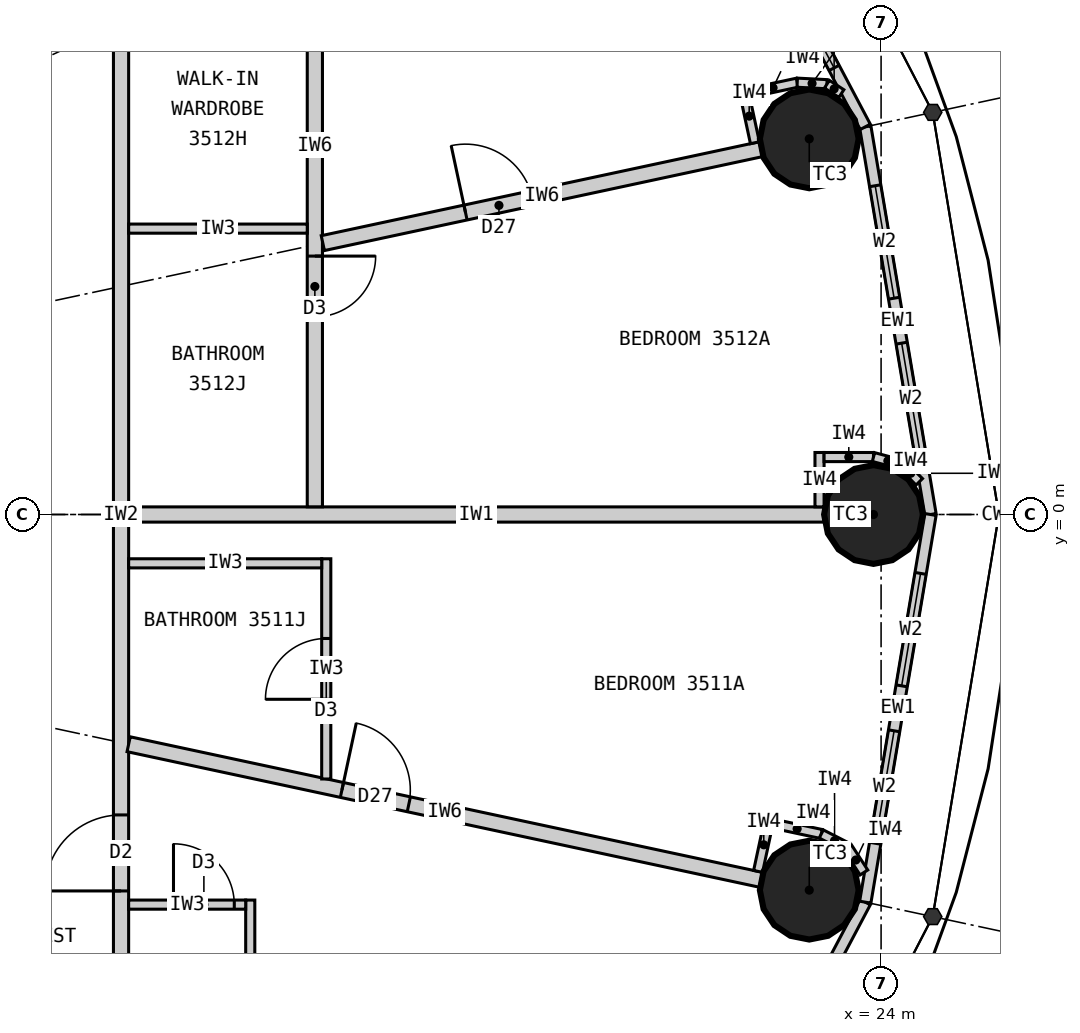
"""IFC4 building model, lengths in metres.
Left out: names, types, materials, properties, quantities, classifications, styles, units other than length and angle.
Written with IfcOpenShell. Run it as: python <this file> out.ifc"""

import sys

from ifc_helpers import new_model, si_unit, direction, frame, frame_2d, origin, origin_2d, place, context, subcontext, project, spatial, rectangle, circle, extrude, clip, halfspace, element, fill, save


model = new_model("IFC4")
c1 = context("Model", 3, precision=1e-05, world=origin(), true_north=direction((0.0, 1.0)))
c2 = subcontext(c1, "Body", "Model", "MODEL_VIEW")
j1 = project(units=[si_unit("LENGTHUNIT", "METRE"), si_unit("PLANEANGLEUNIT", "RADIAN")], contexts=[c1])
p1 = place(None, origin())
s1 = spatial("IfcSite", under=j1, at=p1, CompositionType="ELEMENT")
p2 = place(p1, origin())
s2 = spatial("IfcBuilding", under=s1, at=p2, CompositionType="ELEMENT")
p3 = place(p2, frame((0.0, 0.0, 135.3)))
s3 = spatial("IfcBuildingStorey", under=s2, at=p3, CompositionType="ELEMENT", Elevation=135.3)
for number, where, z_axis, x_axis in (
    (1, (23.9, 0.0, 0.0), (0.0, 0.0, 1.0), (1.0, 0.0, 0.0)),
    (2, (23.055, 4.942, 0.0), (0.0, 0.0, 1.0), (1.0, 0.0, 0.0)),
    (3, (23.055, -4.942, 0.0), (0.0, 0.0, 1.0), (1.0, 0.0, 0.0)),
):
    element("IfcColumn", number, at=place(p3, frame(where, z_axis=z_axis, x_axis=x_axis)), inside=s3, PredefinedType="COLUMN", context=c2, shape_type="Clipping", body=[
        clip(extrude(circle(Radius=0.65, at=origin_2d()), origin(), (0.0, 0.0, 1.0), 3.3), halfspace(frame((0.0, 0.0, 2.25), z_axis=(0.0, 0.0, 1.0), x_axis=(1.0, 0.0, 0.0)), False)),
    ])
p4 = place(p3, frame((24.65, 0.0, 0.0), z_axis=(0.0, 0.0, 1.0), x_axis=(-0.165883894218, 0.986145290329, 0.0)))
e4 = element("IfcWall", 4, at=p4, inside=s3, PredefinedType="ELEMENTEDWALL", context=c2, shape_type="SweptSolid", body=[
    extrude(rectangle(XDim=5.172, YDim=0.15, at=frame_2d((2.586, 0.0))), origin(), (0.0, 0.0, 1.0), 3.05),
])
p5 = place(p4, frame((0.786, 0.0, 0.9)))
e5 = element("IfcOpeningElement", 5, at=p5, cuts=e4, PredefinedType="OPENING", context=c2, shape_type="SweptSolid", body=[
    extrude(rectangle(XDim=1.5, YDim=1.9, at=frame_2d((0.75, 0.95))), frame((0.0, 0.085, 0.0), z_axis=(0.0, -1.0, 0.0), x_axis=(1.0, 0.0, 0.0)), (0.0, 0.0, 1.0), 0.17),
])
p6 = place(p4, frame((2.886, 0.0, 0.9)))
e6 = element("IfcOpeningElement", 6, at=p6, cuts=e4, PredefinedType="OPENING", context=c2, shape_type="SweptSolid", body=[
    extrude(rectangle(XDim=1.5, YDim=1.9, at=frame_2d((0.75, 0.95))), frame((0.0, 0.085, 0.0), z_axis=(0.0, -1.0, 0.0), x_axis=(1.0, 0.0, 0.0)), (0.0, 0.0, 1.0), 0.17),
])
p7 = place(p3, frame((23.792, 5.1, 0.0), z_axis=(0.0, 0.0, 1.0), x_axis=(-0.467814388454, 0.883826735257, 0.0)))
e7 = element("IfcWall", 7, at=p7, inside=s3, PredefinedType="ELEMENTEDWALL", context=c2, shape_type="SweptSolid", body=[
    extrude(rectangle(XDim=5.354, YDim=0.15, at=frame_2d((2.677, 0.0))), origin(), (0.0, 0.0, 1.0), 3.05),
])
p8 = place(p7, frame((0.877, 0.0, 0.9)))
e8 = element("IfcOpeningElement", 8, at=p8, cuts=e7, PredefinedType="OPENING", context=c2, shape_type="SweptSolid", body=[
    extrude(rectangle(XDim=1.5, YDim=1.9, at=frame_2d((0.75, 0.95))), frame((0.0, 0.085, 0.0), z_axis=(0.0, -1.0, 0.0), x_axis=(1.0, 0.0, 0.0)), (0.0, 0.0, 1.0), 0.17),
])
p9 = place(p7, frame((2.977, 0.0, 0.9)))
e9 = element("IfcOpeningElement", 9, at=p9, cuts=e7, PredefinedType="OPENING", context=c2, shape_type="SweptSolid", body=[
    extrude(rectangle(XDim=1.5, YDim=1.9, at=frame_2d((0.75, 0.95))), frame((0.0, 0.085, 0.0), z_axis=(0.0, -1.0, 0.0), x_axis=(1.0, 0.0, 0.0)), (0.0, 0.0, 1.0), 0.17),
])
p10 = place(p3, frame((21.287, -9.832, 0.0), z_axis=(0.0, 0.0, 1.0), x_axis=(0.467814388454, 0.883826735257, 0.0)))
e10 = element("IfcWall", 10, at=p10, inside=s3, PredefinedType="ELEMENTEDWALL", context=c2, shape_type="SweptSolid", body=[
    extrude(rectangle(XDim=5.354, YDim=0.15, at=frame_2d((2.677, 0.0))), origin(), (0.0, 0.0, 1.0), 3.05),
])
p11 = place(p10, frame((0.877, 0.0, 0.9)))
e11 = element("IfcOpeningElement", 11, at=p11, cuts=e10, PredefinedType="OPENING", context=c2, shape_type="SweptSolid", body=[
    extrude(rectangle(XDim=1.5, YDim=1.9, at=frame_2d((0.75, 0.95))), frame((0.0, 0.085, 0.0), z_axis=(0.0, -1.0, 0.0), x_axis=(1.0, 0.0, 0.0)), (0.0, 0.0, 1.0), 0.17),
])
p12 = place(p10, frame((2.977, 0.0, 0.9)))
e12 = element("IfcOpeningElement", 12, at=p12, cuts=e10, PredefinedType="OPENING", context=c2, shape_type="SweptSolid", body=[
    extrude(rectangle(XDim=1.5, YDim=1.9, at=frame_2d((0.75, 0.95))), frame((0.0, 0.085, 0.0), z_axis=(0.0, -1.0, 0.0), x_axis=(1.0, 0.0, 0.0)), (0.0, 0.0, 1.0), 0.17),
])
p13 = place(p3, frame((23.792, -5.1, 0.0), z_axis=(0.0, 0.0, 1.0), x_axis=(0.165883894218, 0.986145290329, 0.0)))
e13 = element("IfcWall", 13, at=p13, inside=s3, PredefinedType="ELEMENTEDWALL", context=c2, shape_type="SweptSolid", body=[
    extrude(rectangle(XDim=5.172, YDim=0.15, at=frame_2d((2.586, 0.0))), origin(), (0.0, 0.0, 1.0), 3.05),
])
p14 = place(p13, frame((0.786, 0.0, 0.9)))
e14 = element("IfcOpeningElement", 14, at=p14, cuts=e13, PredefinedType="OPENING", context=c2, shape_type="SweptSolid", body=[
    extrude(rectangle(XDim=1.5, YDim=1.9, at=frame_2d((0.75, 0.95))), frame((0.0, 0.085, 0.0), z_axis=(0.0, -1.0, 0.0), x_axis=(1.0, 0.0, 0.0)), (0.0, 0.0, 1.0), 0.17),
])
p15 = place(p13, frame((2.886, 0.0, 0.9)))
e15 = element("IfcOpeningElement", 15, at=p15, cuts=e13, PredefinedType="OPENING", context=c2, shape_type="SweptSolid", body=[
    extrude(rectangle(XDim=1.5, YDim=1.9, at=frame_2d((0.75, 0.95))), frame((0.0, 0.085, 0.0), z_axis=(0.0, -1.0, 0.0), x_axis=(1.0, 0.0, 0.0)), (0.0, 0.0, 1.0), 0.17),
])
p16 = place(p3, frame((14.0, -9.9, 0.0), z_axis=(0.0, 0.0, 1.0), x_axis=(0.0, 1.0, 0.0)))
e16 = element("IfcWall", 16, at=p16, inside=s3, PredefinedType="PARTITIONING", context=c2, shape_type="SweptSolid", body=[
    extrude(rectangle(XDim=19.8, YDim=0.2, at=frame_2d((9.9, 0.0))), origin(), (0.0, 0.0, 1.0), 3.05),
])
p17 = place(p16, frame((4.948, 0.0, 0.0)))
e17 = element("IfcOpeningElement", 17, at=p17, cuts=e16, PredefinedType="OPENING", context=c2, shape_type="SweptSolid", body=[
    extrude(rectangle(XDim=1.0, YDim=2.2, at=frame_2d((0.5, 1.1))), frame((0.0, 0.11, 0.0), z_axis=(0.0, -1.0, 0.0), x_axis=(1.0, 0.0, 0.0)), (0.0, 0.0, 1.0), 0.22),
])
p18 = place(p16, frame((18.641, 0.0, 0.0)))
e18 = element("IfcOpeningElement", 18, at=p18, cuts=e16, PredefinedType="OPENING", context=c2, shape_type="SweptSolid", body=[
    extrude(rectangle(XDim=1.0, YDim=2.2, at=frame_2d((0.5, 1.1))), frame((0.0, 0.11, 0.0), z_axis=(0.0, -1.0, 0.0), x_axis=(1.0, 0.0, 0.0)), (0.0, 0.0, 1.0), 0.22),
])
p19 = place(p3, frame((14.1, 0.0, 0.0), z_axis=(0.0, 0.0, 1.0), x_axis=(1.0, 0.0, 0.0)))
e19 = element("IfcWall", 19, at=p19, inside=s3, PredefinedType="PARTITIONING", context=c2, shape_type="SweptSolid", body=[
    extrude(rectangle(XDim=9.15, YDim=0.2, at=frame_2d((4.575, 0.0))), origin(), (0.0, 0.0, 1.0), 2.15),
])
p20 = place(p3, frame((14.1, -3.022, 0.0), z_axis=(0.0, 0.0, 1.0), x_axis=(0.977783513367, -0.209617272638, 0.0)))
e20 = element("IfcWall", 20, at=p20, inside=s3, PredefinedType="PARTITIONING", context=c2, shape_type="SweptSolid", body=[
    extrude(rectangle(XDim=8.508, YDim=0.2, at=frame_2d((4.254, 0.0))), origin(), (0.0, 0.0, 1.0), 2.15),
])
p21 = place(p20, frame((2.87, 0.0, 0.0)))
e21 = element("IfcOpeningElement", 21, at=p21, cuts=e20, PredefinedType="OPENING", context=c2, shape_type="SweptSolid", body=[
    extrude(rectangle(XDim=0.9, YDim=2.1, at=frame_2d((0.45, 1.05))), frame((0.0, 0.11, 0.0), z_axis=(0.0, -1.0, 0.0), x_axis=(1.0, 0.0, 0.0)), (0.0, 0.0, 1.0), 0.22),
])
p22 = place(p3, frame((15.7, -7.152, 0.0), z_axis=(0.0, 0.0, 1.0), x_axis=(0.0, 1.0, 0.0)))
e22 = element("IfcWall", 22, at=p22, inside=s3, PredefinedType="PARTITIONING", context=c2, shape_type="SweptSolid", body=[
    extrude(rectangle(XDim=2.079, YDim=0.12, at=frame_2d((1.04, 0.0))), origin(), (0.0, 0.0, 1.0), 3.05),
])
p23 = place(p3, frame((14.1, -5.133, 0.0), z_axis=(0.0, 0.0, 1.0), x_axis=(1.0, 0.0, 0.0)))
e23 = element("IfcWall", 23, at=p23, inside=s3, PredefinedType="PARTITIONING", context=c2, shape_type="SweptSolid", body=[
    extrude(rectangle(XDim=1.54, YDim=0.12, at=frame_2d((0.77, 0.0))), origin(), (0.0, 0.0, 1.0), 3.05),
])
p24 = place(p23, frame((0.59, 0.0, 0.0)))
e24 = element("IfcOpeningElement", 24, at=p24, cuts=e23, PredefinedType="OPENING", context=c2, shape_type="SweptSolid", body=[
    extrude(rectangle(XDim=0.8, YDim=2.1, at=frame_2d((0.4, 1.05))), frame((0.0, 0.07, 0.0), z_axis=(0.0, -1.0, 0.0), x_axis=(1.0, 0.0, 0.0)), (0.0, 0.0, 1.0), 0.14),
])
p25 = place(p3, frame((16.7, -3.48, 0.0), z_axis=(0.0, 0.0, 1.0), x_axis=(0.0, 1.0, 0.0)))
e25 = element("IfcWall", 25, at=p25, inside=s3, PredefinedType="PARTITIONING", context=c2, shape_type="SweptSolid", body=[
    extrude(rectangle(XDim=2.897, YDim=0.12, at=frame_2d((1.449, 0.0))), origin(), (0.0, 0.0, 1.0), 3.05),
])
p26 = place(p25, frame((1.049, 0.0, 0.0)))
e26 = element("IfcOpeningElement", 26, at=p26, cuts=e25, PredefinedType="OPENING", context=c2, shape_type="SweptSolid", body=[
    extrude(rectangle(XDim=0.8, YDim=2.1, at=frame_2d((0.4, 1.05))), frame((0.0, 0.07, 0.0), z_axis=(0.0, -1.0, 0.0), x_axis=(1.0, 0.0, 0.0)), (0.0, 0.0, 1.0), 0.14),
])
p27 = place(p3, frame((14.1, -0.643, 0.0), z_axis=(0.0, 0.0, 1.0), x_axis=(1.0, 0.0, 0.0)))
e27 = element("IfcWall", 27, at=p27, inside=s3, PredefinedType="PARTITIONING", context=c2, shape_type="SweptSolid", body=[
    extrude(rectangle(XDim=2.54, YDim=0.12, at=frame_2d((1.27, 0.0))), origin(), (0.0, 0.0, 1.0), 3.05),
])
p28 = place(p3, frame((16.55, 0.101, 0.0), z_axis=(0.0, 0.0, 1.0), x_axis=(0.0, 1.0, 0.0)))
e28 = element("IfcWall", 28, at=p28, inside=s3, PredefinedType="PARTITIONING", context=c2, shape_type="SweptSolid", body=[
    extrude(rectangle(XDim=9.508, YDim=0.2, at=frame_2d((4.754, 0.0))), origin(), (0.0, 0.0, 1.0), 3.05),
])
p29 = place(p28, frame((2.499, 0.0, 0.0)))
e29 = element("IfcOpeningElement", 29, at=p29, cuts=e28, PredefinedType="OPENING", context=c2, shape_type="SweptSolid", body=[
    extrude(rectangle(XDim=0.8, YDim=2.1, at=frame_2d((0.4, 1.05))), frame((0.0, 0.11, 0.0), z_axis=(0.0, -1.0, 0.0), x_axis=(1.0, 0.0, 0.0)), (0.0, 0.0, 1.0), 0.22),
])
p30 = place(p28, frame((6.94, 0.0, 0.0)))
e30 = element("IfcOpeningElement", 30, at=p30, cuts=e28, PredefinedType="OPENING", context=c2, shape_type="SweptSolid", body=[
    extrude(rectangle(XDim=0.9, YDim=2.1, at=frame_2d((0.45, 1.05))), frame((0.0, 0.11, 0.0), z_axis=(0.0, -1.0, 0.0), x_axis=(1.0, 0.0, 0.0)), (0.0, 0.0, 1.0), 0.22),
])
p31 = place(p3, frame((16.655, 3.57, 0.0), z_axis=(0.0, 0.0, 1.0), x_axis=(0.977781197989, 0.209628072687, 0.0)))
e31 = element("IfcWall", 31, at=p31, inside=s3, PredefinedType="PARTITIONING", context=c2, shape_type="SweptSolid", body=[
    extrude(rectangle(XDim=5.896, YDim=0.2, at=frame_2d((2.948, 0.0))), origin(), (0.0, 0.0, 1.0), 2.15),
])
p32 = place(p31, frame((1.92, 0.0, 0.0)))
e32 = element("IfcOpeningElement", 32, at=p32, cuts=e31, PredefinedType="OPENING", context=c2, shape_type="SweptSolid", body=[
    extrude(rectangle(XDim=0.9, YDim=2.1, at=frame_2d((0.45, 1.05))), frame((0.0, 0.11, 0.0), z_axis=(0.0, -1.0, 0.0), x_axis=(1.0, 0.0, 0.0)), (0.0, 0.0, 1.0), 0.22),
])
p33 = place(p3, frame((14.1, 3.761, 0.0), z_axis=(0.0, 0.0, 1.0), x_axis=(1.0, 0.0, 0.0)))
e33 = element("IfcWall", 33, at=p33, inside=s3, PredefinedType="PARTITIONING", context=c2, shape_type="SweptSolid", body=[
    extrude(rectangle(XDim=2.35, YDim=0.12, at=frame_2d((1.175, 0.0))), origin(), (0.0, 0.0, 1.0), 2.15),
])
p34 = place(p3, frame((23.19, 0.1, 0.0), z_axis=(0.0, 0.0, 1.0), x_axis=(0.0, 1.0, 0.0)))
e34 = element("IfcWall", 34, at=p34, inside=s3, PredefinedType="PARTITIONING", context=c2, shape_type="SweptSolid", body=[
    extrude(rectangle(XDim=0.716, YDim=0.12, at=frame_2d((0.358, 0.0))), origin(), (0.0, 0.0, 1.0), 3.05),
])
p35 = place(p3, frame((23.25, 0.756, 0.0), z_axis=(0.0, 0.0, 1.0), x_axis=(1.0, 0.0, 0.0)))
e35 = element("IfcWall", 35, at=p35, inside=s3, PredefinedType="PARTITIONING", context=c2, shape_type="SweptSolid", body=[
    extrude(rectangle(XDim=0.65, YDim=0.12, at=frame_2d((0.325, 0.0))), origin(), (0.0, 0.0, 1.0), 3.05),
])
p36 = place(p3, frame((23.9, 0.756, 0.0), z_axis=(0.0, 0.0, 1.0), x_axis=(0.965892334856, -0.2589440045, 0.0)))
e36 = element("IfcWall", 36, at=p36, inside=s3, PredefinedType="PARTITIONING", context=c2, shape_type="SweptSolid", body=[
    extrude(rectangle(XDim=0.391, YDim=0.12, at=frame_2d((0.196, 0.0))), origin(), (0.0, 0.0, 1.0), 3.05),
])
p37 = place(p3, frame((24.278, 0.655, 0.0), z_axis=(0.0, 0.0, 1.0), x_axis=(0.707106781187, -0.707106781187, 0.0)))
e37 = element("IfcWall", 37, at=p37, inside=s3, PredefinedType="PARTITIONING", context=c2, shape_type="SweptSolid", body=[
    extrude(rectangle(XDim=0.318, YDim=0.12, at=frame_2d((0.159, 0.0))), origin(), (0.0, 0.0, 1.0), 3.05),
])
p38 = place(p3, frame((22.34, 4.891, 0.0), z_axis=(0.0, 0.0, 1.0), x_axis=(-0.20948248875, 0.977812398626, 0.0)))
e38 = element("IfcWall", 38, at=p38, inside=s3, PredefinedType="PARTITIONING", context=c2, shape_type="SweptSolid", body=[
    extrude(rectangle(XDim=0.716, YDim=0.12, at=frame_2d((0.358, 0.0))), origin(), (0.0, 0.0, 1.0), 3.05),
])
p39 = place(p3, frame((22.261, 5.545, 0.0), z_axis=(0.0, 0.0, 1.0), x_axis=(0.977785919621, 0.209606048079, 0.0)))
e39 = element("IfcWall", 39, at=p39, inside=s3, PredefinedType="PARTITIONING", context=c2, shape_type="SweptSolid", body=[
    extrude(rectangle(XDim=0.65, YDim=0.12, at=frame_2d((0.325, 0.0))), origin(), (0.0, 0.0, 1.0), 3.05),
])
p40 = place(p3, frame((22.896, 5.681, 0.0), z_axis=(0.0, 0.0, 1.0), x_axis=(0.998721012592, -0.050560251262, 0.0)))
e40 = element("IfcWall", 40, at=p40, inside=s3, PredefinedType="PARTITIONING", context=c2, shape_type="SweptSolid", body=[
    extrude(rectangle(XDim=0.391, YDim=0.12, at=frame_2d((0.196, 0.0))), origin(), (0.0, 0.0, 1.0), 3.05),
])
p41 = place(p3, frame((23.287, 5.661, 0.0), z_axis=(0.0, 0.0, 1.0), x_axis=(0.839916668497, -0.542715385798, 0.0)))
e41 = element("IfcWall", 41, at=p41, inside=s3, PredefinedType="PARTITIONING", context=c2, shape_type="SweptSolid", body=[
    extrude(rectangle(XDim=0.227, YDim=0.12, at=frame_2d((0.113, 0.0))), origin(), (0.0, 0.0, 1.0), 3.05),
])
p42 = place(p3, frame((22.382, -4.695, 0.0), z_axis=(0.0, 0.0, 1.0), x_axis=(0.209808658628, 0.977742464438, 0.0)))
e42 = element("IfcWall", 42, at=p42, inside=s3, PredefinedType="PARTITIONING", context=c2, shape_type="SweptSolid", body=[
    extrude(rectangle(XDim=0.716, YDim=0.12, at=frame_2d((0.358, 0.0))), origin(), (0.0, 0.0, 1.0), 3.05),
])
p43 = place(p3, frame((22.578, -4.067, 0.0), z_axis=(0.0, 0.0, 1.0), x_axis=(0.977802414077, -0.209529088731, 0.0)))
e43 = element("IfcWall", 43, at=p43, inside=s3, PredefinedType="PARTITIONING", context=c2, shape_type="SweptSolid", body=[
    extrude(rectangle(XDim=0.65, YDim=0.12, at=frame_2d((0.325, 0.0))), origin(), (0.0, 0.0, 1.0), 3.05),
])
for number, where, z_axis, x_axis in (
    (44, (23.213, -4.203, 0.0), (0.0, 0.0, 1.0), (0.89, -0.456, 0.0)),
    (45, (23.562, -4.381, 0.0), (0.0, 0.0, 1.0), (0.543, -0.84, 0.0)),
):
    element("IfcWall", number, at=place(p3, frame(where, z_axis=z_axis, x_axis=x_axis)), inside=s3, PredefinedType="PARTITIONING", context=c2, shape_type="SweptSolid", body=[
        extrude(rectangle(XDim=0.391, YDim=0.12, at=frame_2d((0.196, 0.0))), origin(), (0.0, 0.0, 1.0), 3.05),
    ])
p44 = place(p5, origin())
e46 = element("IfcWindow", 46, at=p44, inside=s3, PartitioningType="SINGLE_PANEL", PredefinedType="WINDOW", context=c2, shape_type="SweptSolid", body=[
    extrude(rectangle(XDim=1.5, YDim=1.9, at=frame_2d((0.75, 0.95))), frame((0.0, 0.03, 0.0), z_axis=(0.0, -1.0, 0.0), x_axis=(1.0, 0.0, 0.0)), (0.0, 0.0, 1.0), 0.06),
])
fill(e5, e46)
p45 = place(p6, origin())
e47 = element("IfcWindow", 47, at=p45, inside=s3, PartitioningType="SINGLE_PANEL", PredefinedType="WINDOW", context=c2, shape_type="SweptSolid", body=[
    extrude(rectangle(XDim=1.5, YDim=1.9, at=frame_2d((0.75, 0.95))), frame((0.0, 0.03, 0.0), z_axis=(0.0, -1.0, 0.0), x_axis=(1.0, 0.0, 0.0)), (0.0, 0.0, 1.0), 0.06),
])
fill(e6, e47)
p46 = place(p8, origin())
e48 = element("IfcWindow", 48, at=p46, inside=s3, PartitioningType="SINGLE_PANEL", PredefinedType="WINDOW", context=c2, shape_type="SweptSolid", body=[
    extrude(rectangle(XDim=1.5, YDim=1.9, at=frame_2d((0.75, 0.95))), frame((0.0, 0.03, 0.0), z_axis=(0.0, -1.0, 0.0), x_axis=(1.0, 0.0, 0.0)), (0.0, 0.0, 1.0), 0.06),
])
fill(e8, e48)
p47 = place(p14, origin())
e49 = element("IfcWindow", 49, at=p47, inside=s3, PartitioningType="SINGLE_PANEL", PredefinedType="WINDOW", context=c2, shape_type="SweptSolid", body=[
    extrude(rectangle(XDim=1.5, YDim=1.9, at=frame_2d((0.75, 0.95))), frame((0.0, 0.03, 0.0), z_axis=(0.0, -1.0, 0.0), x_axis=(1.0, 0.0, 0.0)), (0.0, 0.0, 1.0), 0.06),
])
fill(e14, e49)
p48 = place(p15, origin())
e50 = element("IfcWindow", 50, at=p48, inside=s3, PartitioningType="SINGLE_PANEL", PredefinedType="WINDOW", context=c2, shape_type="SweptSolid", body=[
    extrude(rectangle(XDim=1.5, YDim=1.9, at=frame_2d((0.75, 0.95))), frame((0.0, 0.03, 0.0), z_axis=(0.0, -1.0, 0.0), x_axis=(1.0, 0.0, 0.0)), (0.0, 0.0, 1.0), 0.06),
])
fill(e15, e50)
p49 = place(p24, origin())
e51 = element("IfcDoor", 51, at=p49, inside=s3, OperationType="SINGLE_SWING_LEFT", PredefinedType="DOOR", context=c2, shape_type="SweptSolid", body=[
    extrude(rectangle(XDim=0.8, YDim=2.1, at=frame_2d((0.4, 1.05))), frame((0.0, 0.025, 0.0), z_axis=(0.0, -1.0, 0.0), x_axis=(1.0, 0.0, 0.0)), (0.0, 0.0, 1.0), 0.05),
])
fill(e24, e51)
p50 = place(p17, origin())
e52 = element("IfcDoor", 52, at=p50, inside=s3, OperationType="SINGLE_SWING_LEFT", PredefinedType="DOOR", context=c2, shape_type="SweptSolid", body=[
    extrude(rectangle(XDim=1.0, YDim=2.2, at=frame_2d((0.5, 1.1))), frame((0.0, 0.025, 0.0), z_axis=(0.0, -1.0, 0.0), x_axis=(1.0, 0.0, 0.0)), (0.0, 0.0, 1.0), 0.05),
])
fill(e17, e52)
p51 = place(p26, origin())
e53 = element("IfcDoor", 53, at=p51, inside=s3, OperationType="SINGLE_SWING_LEFT", PredefinedType="DOOR", context=c2, shape_type="SweptSolid", body=[
    extrude(rectangle(XDim=0.8, YDim=2.1, at=frame_2d((0.4, 1.05))), frame((0.0, 0.025, 0.0), z_axis=(0.0, -1.0, 0.0), x_axis=(1.0, 0.0, 0.0)), (0.0, 0.0, 1.0), 0.05),
])
fill(e26, e53)
p52 = place(p21, origin())
e54 = element("IfcDoor", 54, at=p52, inside=s3, OperationType="SINGLE_SWING_LEFT", PredefinedType="DOOR", context=c2, shape_type="SweptSolid", body=[
    extrude(rectangle(XDim=0.9, YDim=2.1, at=frame_2d((0.45, 1.05))), frame((0.0, 0.025, 0.0), z_axis=(0.0, -1.0, 0.0), x_axis=(1.0, 0.0, 0.0)), (0.0, 0.0, 1.0), 0.05),
])
fill(e21, e54)
p53 = place(p29, origin())
e55 = element("IfcDoor", 55, at=p53, inside=s3, OperationType="SINGLE_SWING_RIGHT", PredefinedType="DOOR", context=c2, shape_type="SweptSolid", body=[
    extrude(rectangle(XDim=0.8, YDim=2.1, at=frame_2d((0.4, 1.05))), frame((0.0, 0.025, 0.0), z_axis=(0.0, -1.0, 0.0), x_axis=(1.0, 0.0, 0.0)), (0.0, 0.0, 1.0), 0.05),
])
fill(e29, e55)
p54 = place(p32, origin())
e56 = element("IfcDoor", 56, at=p54, inside=s3, OperationType="SINGLE_SWING_LEFT", PredefinedType="DOOR", context=c2, shape_type="SweptSolid", body=[
    extrude(rectangle(XDim=0.9, YDim=2.1, at=frame_2d((0.45, 1.05))), frame((0.0, 0.025, 0.0), z_axis=(0.0, -1.0, 0.0), x_axis=(1.0, 0.0, 0.0)), (0.0, 0.0, 1.0), 0.05),
])
fill(e32, e56)
save(model, sys.argv[1])
